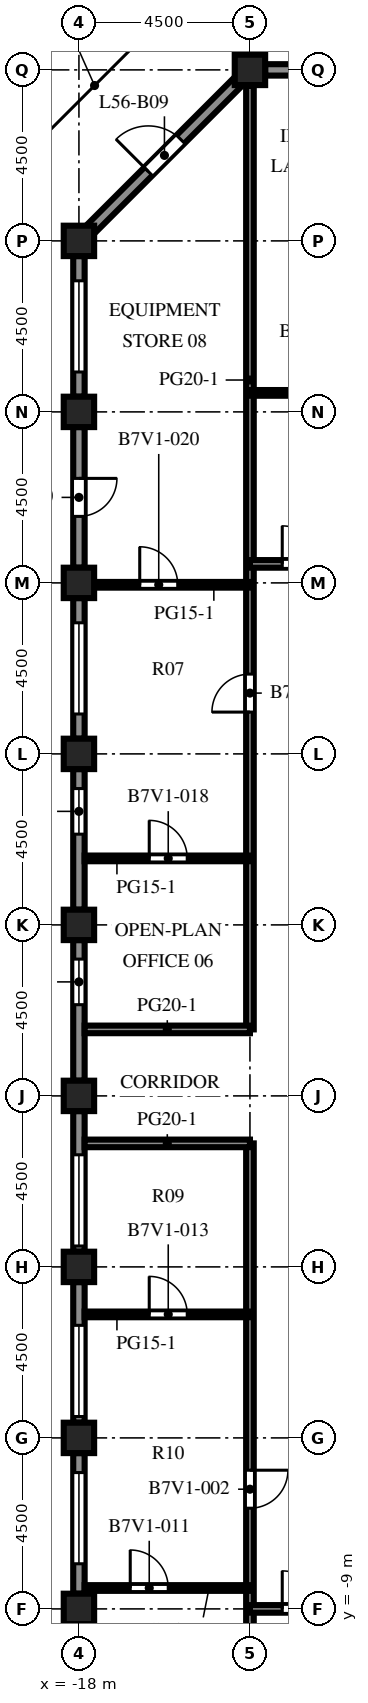
"""IFC4 building model, lengths in metres.
Left out: names, types, materials, properties, quantities, classifications, styles, units other than length and angle.
Written with IfcOpenShell. Run it as: python <this file> out.ifc"""

import sys

from ifc_helpers import new_model, si_unit, direction, frame, frame_2d, origin, origin_2d, place, context, subcontext, project, spatial, rectangle, extrude, element, fill, save


model = new_model("IFC4")
c1 = context("Model", 3, precision=1e-05, world=origin(), true_north=direction((0.0, 1.0)))
c2 = subcontext(c1, "Body", "Model", "MODEL_VIEW")
j1 = project(units=[si_unit("LENGTHUNIT", "METRE"), si_unit("PLANEANGLEUNIT", "RADIAN")], contexts=[c1])
p1 = place(None, origin())
s1 = spatial("IfcSite", under=j1, at=p1, CompositionType="ELEMENT")
p2 = place(p1, origin())
s2 = spatial("IfcBuilding", under=s1, at=p2, CompositionType="ELEMENT")
p3 = place(p2, frame((0.0, 0.0, 248.0)))
s3 = spatial("IfcBuildingStorey", under=s2, at=p3, CompositionType="ELEMENT", Elevation=248.0)
for number, where, z_axis, x_axis in (
    (1, (-18.0, -9.0, 0.0), (0.0, 0.0, 1.0), (1.0, 0.0, 0.0)),
    (2, (-18.0, -4.5, 0.0), (0.0, 0.0, 1.0), (1.0, 0.0, 0.0)),
    (3, (-18.0, 0.0, 0.0), (0.0, 0.0, 1.0), (1.0, 0.0, 0.0)),
    (4, (-18.0, 4.5, 0.0), (0.0, 0.0, 1.0), (1.0, 0.0, 0.0)),
    (5, (-18.0, 9.0, 0.0), (0.0, 0.0, 1.0), (1.0, 0.0, 0.0)),
    (6, (-18.0, 13.5, 0.0), (0.0, 0.0, 1.0), (1.0, 0.0, 0.0)),
    (7, (-18.0, 18.0, 0.0), (0.0, 0.0, 1.0), (1.0, 0.0, 0.0)),
    (8, (-18.0, 22.5, 0.0), (0.0, 0.0, 1.0), (1.0, 0.0, 0.0)),
    (9, (-18.0, 27.0, 0.0), (0.0, 0.0, 1.0), (1.0, 0.0, 0.0)),
    (10, (-13.5, 31.5, 0.0), (0.0, 0.0, 1.0), (1.0, 0.0, 0.0)),
):
    element("IfcColumn", number, at=place(p3, frame(where, z_axis=z_axis, x_axis=x_axis)), inside=s3, PredefinedType="COLUMN", context=c2, shape_type="SweptSolid", body=[
        extrude(rectangle(XDim=0.8, YDim=0.8, at=origin_2d()), origin(), (0.0, 0.0, 1.0), 4.1),
    ])
p4 = place(p3, frame((-13.1, 31.5, 0.0), z_axis=(0.0, 0.0, 1.0), x_axis=(1.0, 0.0, 0.0)))
e11 = element("IfcWall", 11, at=p4, inside=s3, PredefinedType="SOLIDWALL", context=c2, shape_type="SweptSolid", body=[
    extrude(rectangle(XDim=3.7, YDim=0.3, at=frame_2d((1.85, 0.0))), origin(), (0.0, 0.0, 1.0), 2.85),
])
p5 = place(p4, frame((0.65, 0.0, 0.8)))
e12 = element("IfcOpeningElement", 12, at=p5, cuts=e11, PredefinedType="OPENING", context=c2, shape_type="SweptSolid", body=[
    extrude(rectangle(XDim=2.4, YDim=1.7, at=frame_2d((1.2, 0.85))), frame((0.0, 0.16, 0.0), z_axis=(0.0, -1.0, 0.0), x_axis=(1.0, 0.0, 0.0)), (0.0, 0.0, 1.0), 0.32),
])
p6 = place(p3, frame((-17.706, 27.294, 0.0), z_axis=(0.0, 0.0, 1.0), x_axis=(0.707106781187, 0.707106781187, 0.0)))
e13 = element("IfcWall", 13, at=p6, inside=s3, PredefinedType="SOLIDWALL", context=c2, shape_type="SweptSolid", body=[
    extrude(rectangle(XDim=5.532, YDim=0.3, at=frame_2d((2.766, 0.0))), origin(), (0.0, 0.0, 1.0), 2.85),
])
p7 = place(p6, frame((2.166, 0.0, 0.0)))
e14 = element("IfcOpeningElement", 14, at=p7, cuts=e13, PredefinedType="OPENING", context=c2, shape_type="SweptSolid", body=[
    extrude(rectangle(XDim=1.2, YDim=2.2, at=frame_2d((0.6, 1.1))), frame((0.0, 0.16, 0.0), z_axis=(0.0, -1.0, 0.0), x_axis=(1.0, 0.0, 0.0)), (0.0, 0.0, 1.0), 0.32),
])
p8 = place(p3, frame((-18.0, 22.9, 0.0), z_axis=(0.0, 0.0, 1.0), x_axis=(0.0, 1.0, 0.0)))
e15 = element("IfcWall", 15, at=p8, inside=s3, PredefinedType="SOLIDWALL", context=c2, shape_type="SweptSolid", body=[
    extrude(rectangle(XDim=3.7, YDim=0.3, at=frame_2d((1.85, 0.0))), origin(), (0.0, 0.0, 1.0), 2.85),
])
p9 = place(p8, frame((0.65, 0.0, 0.8)))
e16 = element("IfcOpeningElement", 16, at=p9, cuts=e15, PredefinedType="OPENING", context=c2, shape_type="SweptSolid", body=[
    extrude(rectangle(XDim=2.4, YDim=1.7, at=frame_2d((1.2, 0.85))), frame((0.0, 0.16, 0.0), z_axis=(0.0, -1.0, 0.0), x_axis=(1.0, 0.0, 0.0)), (0.0, 0.0, 1.0), 0.32),
])
p10 = place(p3, frame((-18.0, 18.4, 0.0), z_axis=(0.0, 0.0, 1.0), x_axis=(0.0, 1.0, 0.0)))
e17 = element("IfcWall", 17, at=p10, inside=s3, PredefinedType="SOLIDWALL", context=c2, shape_type="SweptSolid", body=[
    extrude(rectangle(XDim=3.7, YDim=0.3, at=frame_2d((1.85, 0.0))), origin(), (0.0, 0.0, 1.0), 2.85),
])
p11 = place(p10, frame((1.35, 0.0, 0.0)))
e18 = element("IfcOpeningElement", 18, at=p11, cuts=e17, PredefinedType="OPENING", context=c2, shape_type="SweptSolid", body=[
    extrude(rectangle(XDim=1.0, YDim=2.2, at=frame_2d((0.5, 1.1))), frame((0.0, 0.16, 0.0), z_axis=(0.0, -1.0, 0.0), x_axis=(1.0, 0.0, 0.0)), (0.0, 0.0, 1.0), 0.32),
])
p12 = place(p3, frame((-18.0, 13.9, 0.0), z_axis=(0.0, 0.0, 1.0), x_axis=(0.0, 1.0, 0.0)))
e19 = element("IfcWall", 19, at=p12, inside=s3, PredefinedType="SOLIDWALL", context=c2, shape_type="SweptSolid", body=[
    extrude(rectangle(XDim=3.7, YDim=0.3, at=frame_2d((1.85, 0.0))), origin(), (0.0, 0.0, 1.0), 2.85),
])
p13 = place(p12, frame((0.65, 0.0, 0.8)))
e20 = element("IfcOpeningElement", 20, at=p13, cuts=e19, PredefinedType="OPENING", context=c2, shape_type="SweptSolid", body=[
    extrude(rectangle(XDim=2.4, YDim=1.7, at=frame_2d((1.2, 0.85))), frame((0.0, 0.16, 0.0), z_axis=(0.0, -1.0, 0.0), x_axis=(1.0, 0.0, 0.0)), (0.0, 0.0, 1.0), 0.32),
])
p14 = place(p3, frame((-18.0, 9.4, 0.0), z_axis=(0.0, 0.0, 1.0), x_axis=(0.0, 1.0, 0.0)))
e21 = element("IfcWall", 21, at=p14, inside=s3, PredefinedType="SOLIDWALL", context=c2, shape_type="SweptSolid", body=[
    extrude(rectangle(XDim=3.7, YDim=0.3, at=frame_2d((1.85, 0.0))), origin(), (0.0, 0.0, 1.0), 2.85),
])
p15 = place(p14, frame((1.988, 0.0, 0.8)))
e22 = element("IfcOpeningElement", 22, at=p15, cuts=e21, PredefinedType="OPENING", context=c2, shape_type="SweptSolid", body=[
    extrude(rectangle(XDim=1.2, YDim=1.7, at=frame_2d((0.6, 0.85))), frame((0.0, 0.16, 0.0), z_axis=(0.0, -1.0, 0.0), x_axis=(1.0, 0.0, 0.0)), (0.0, 0.0, 1.0), 0.32),
])
p16 = place(p3, frame((-18.0, 4.9, 0.0), z_axis=(0.0, 0.0, 1.0), x_axis=(0.0, 1.0, 0.0)))
e23 = element("IfcWall", 23, at=p16, inside=s3, PredefinedType="SOLIDWALL", context=c2, shape_type="SweptSolid", body=[
    extrude(rectangle(XDim=3.7, YDim=0.3, at=frame_2d((1.85, 0.0))), origin(), (0.0, 0.0, 1.0), 2.85),
])
p17 = place(p16, frame((2.0, 0.0, 0.8)))
e24 = element("IfcOpeningElement", 24, at=p17, cuts=e23, PredefinedType="OPENING", context=c2, shape_type="SweptSolid", body=[
    extrude(rectangle(XDim=1.2, YDim=1.7, at=frame_2d((0.6, 0.85))), frame((0.0, 0.16, 0.0), z_axis=(0.0, -1.0, 0.0), x_axis=(1.0, 0.0, 0.0)), (0.0, 0.0, 1.0), 0.32),
])
p18 = place(p3, frame((-18.0, 0.4, 0.0), z_axis=(0.0, 0.0, 1.0), x_axis=(0.0, 1.0, 0.0)))
e25 = element("IfcWall", 25, at=p18, inside=s3, PredefinedType="SOLIDWALL", context=c2, shape_type="SweptSolid", body=[
    extrude(rectangle(XDim=3.7, YDim=0.3, at=frame_2d((1.85, 0.0))), origin(), (0.0, 0.0, 1.0), 2.85),
])
p19 = place(p18, frame((0.15, 0.0, 0.8)))
e26 = element("IfcOpeningElement", 26, at=p19, cuts=e25, PredefinedType="OPENING", context=c2, shape_type="SweptSolid", body=[
    extrude(rectangle(XDim=2.4, YDim=1.7, at=frame_2d((1.2, 0.85))), frame((0.0, 0.16, 0.0), z_axis=(0.0, -1.0, 0.0), x_axis=(1.0, 0.0, 0.0)), (0.0, 0.0, 1.0), 0.32),
])
p20 = place(p3, frame((-18.0, -4.1, 0.0), z_axis=(0.0, 0.0, 1.0), x_axis=(0.0, 1.0, 0.0)))
e27 = element("IfcWall", 27, at=p20, inside=s3, PredefinedType="SOLIDWALL", context=c2, shape_type="SweptSolid", body=[
    extrude(rectangle(XDim=3.7, YDim=0.3, at=frame_2d((1.85, 0.0))), origin(), (0.0, 0.0, 1.0), 2.85),
])
p21 = place(p20, frame((0.163, 0.0, 0.8)))
e28 = element("IfcOpeningElement", 28, at=p21, cuts=e27, PredefinedType="OPENING", context=c2, shape_type="SweptSolid", body=[
    extrude(rectangle(XDim=2.4, YDim=1.7, at=frame_2d((1.2, 0.85))), frame((0.0, 0.16, 0.0), z_axis=(0.0, -1.0, 0.0), x_axis=(1.0, 0.0, 0.0)), (0.0, 0.0, 1.0), 0.32),
])
p22 = place(p3, frame((-18.0, -8.6, 0.0), z_axis=(0.0, 0.0, 1.0), x_axis=(0.0, 1.0, 0.0)))
e29 = element("IfcWall", 29, at=p22, inside=s3, PredefinedType="SOLIDWALL", context=c2, shape_type="SweptSolid", body=[
    extrude(rectangle(XDim=3.7, YDim=0.3, at=frame_2d((1.85, 0.0))), origin(), (0.0, 0.0, 1.0), 2.85),
])
p23 = place(p22, frame((0.788, 0.0, 0.8)))
e30 = element("IfcOpeningElement", 30, at=p23, cuts=e29, PredefinedType="OPENING", context=c2, shape_type="SweptSolid", body=[
    extrude(rectangle(XDim=2.4, YDim=1.7, at=frame_2d((1.2, 0.85))), frame((0.0, 0.16, 0.0), z_axis=(0.0, -1.0, 0.0), x_axis=(1.0, 0.0, 0.0)), (0.0, 0.0, 1.0), 0.32),
])
p24 = place(p3, frame((-13.5, -22.077, 0.0), z_axis=(0.0, 0.0, 1.0), x_axis=(0.0, 1.0, 0.0)))
e31 = element("IfcWall", 31, at=p24, inside=s3, PredefinedType="PARTITIONING", context=c2, shape_type="SweptSolid", body=[
    extrude(rectangle(XDim=25.327, YDim=0.2, at=frame_2d((12.664, 0.0))), origin(), (0.0, 0.0, 1.0), 3.65),
])
p25 = place(p24, frame((15.727, 0.0, 0.0)))
e32 = element("IfcOpeningElement", 32, at=p25, cuts=e31, PredefinedType="OPENING", context=c2, shape_type="SweptSolid", body=[
    extrude(rectangle(XDim=1.0, YDim=2.1, at=frame_2d((0.5, 1.05))), frame((0.0, 0.11, 0.0), z_axis=(0.0, -1.0, 0.0), x_axis=(1.0, 0.0, 0.0)), (0.0, 0.0, 1.0), 0.22),
])
p26 = place(p3, frame((-13.5, 6.25, 0.0), z_axis=(0.0, 0.0, 1.0), x_axis=(0.0, 1.0, 0.0)))
e33 = element("IfcWall", 33, at=p26, inside=s3, PredefinedType="PARTITIONING", context=c2, shape_type="SweptSolid", body=[
    extrude(rectangle(XDim=24.827, YDim=0.2, at=frame_2d((12.414, 0.0))), origin(), (0.0, 0.0, 1.0), 3.65),
])
p27 = place(p26, frame((8.35, 0.0, 0.0)))
e34 = element("IfcOpeningElement", 34, at=p27, cuts=e33, PredefinedType="OPENING", context=c2, shape_type="SweptSolid", body=[
    extrude(rectangle(XDim=1.0, YDim=2.1, at=frame_2d((0.5, 1.05))), frame((0.0, 0.11, 0.0), z_axis=(0.0, -1.0, 0.0), x_axis=(1.0, 0.0, 0.0)), (0.0, 0.0, 1.0), 0.22),
])
p28 = place(p3, frame((-10.5, -9.0, 0.0), z_axis=(0.0, 0.0, 1.0), x_axis=(-1.0, 0.0, 0.0)))
e35 = element("IfcWall", 35, at=p28, inside=s3, PredefinedType="PARTITIONING", context=c2, shape_type="SweptSolid", body=[
    extrude(rectangle(XDim=3.0, YDim=0.2, at=frame_2d((1.5, 0.0))), origin(), (0.0, 0.0, 1.0), 3.65),
])
p29 = place(p28, frame((1.15, 0.0, 0.0)))
e36 = element("IfcOpeningElement", 36, at=p29, cuts=e35, PredefinedType="OPENING", context=c2, shape_type="SweptSolid", body=[
    extrude(rectangle(XDim=1.0, YDim=2.1, at=frame_2d((0.5, 1.05))), frame((0.0, 0.11, 0.0), z_axis=(0.0, -1.0, 0.0), x_axis=(1.0, 0.0, 0.0)), (0.0, 0.0, 1.0), 0.22),
])
p30 = place(p3, frame((-13.5, -8.45, 0.0), z_axis=(0.0, 0.0, 1.0), x_axis=(-1.0, 0.0, 0.0)))
e37 = element("IfcWall", 37, at=p30, inside=s3, PredefinedType="PARTITIONING", context=c2, shape_type="SweptSolid", body=[
    extrude(rectangle(XDim=4.35, YDim=0.15, at=frame_2d((2.175, 0.0))), origin(), (0.0, 0.0, 1.0), 3.65),
])
p31 = place(p30, frame((2.15, 0.0, 0.0)))
e38 = element("IfcOpeningElement", 38, at=p31, cuts=e37, PredefinedType="OPENING", context=c2, shape_type="SweptSolid", body=[
    extrude(rectangle(XDim=1.0, YDim=2.1, at=frame_2d((0.5, 1.05))), frame((0.0, 0.085, 0.0), z_axis=(0.0, -1.0, 0.0), x_axis=(1.0, 0.0, 0.0)), (0.0, 0.0, 1.0), 0.17),
])
p32 = place(p3, frame((-17.85, -1.25, 0.0), z_axis=(0.0, 0.0, 1.0), x_axis=(1.0, 0.0, 0.0)))
e39 = element("IfcWall", 39, at=p32, inside=s3, PredefinedType="PARTITIONING", context=c2, shape_type="SweptSolid", body=[
    extrude(rectangle(XDim=4.35, YDim=0.15, at=frame_2d((2.175, 0.0))), origin(), (0.0, 0.0, 1.0), 3.65),
])
p33 = place(p32, frame((1.7, 0.0, 0.0)))
e40 = element("IfcOpeningElement", 40, at=p33, cuts=e39, PredefinedType="OPENING", context=c2, shape_type="SweptSolid", body=[
    extrude(rectangle(XDim=1.0, YDim=2.1, at=frame_2d((0.5, 1.05))), frame((0.0, 0.085, 0.0), z_axis=(0.0, -1.0, 0.0), x_axis=(1.0, 0.0, 0.0)), (0.0, 0.0, 1.0), 0.17),
])
for number, where, z_axis, x_axis in (
    (41, (-17.85, 3.25, 0.0), (0.0, 0.0, 1.0), (1.0, 0.0, 0.0)),
    (42, (-17.85, 6.25, 0.0), (0.0, 0.0, 1.0), (1.0, 0.0, 0.0)),
):
    element("IfcWall", number, at=place(p3, frame(where, z_axis=z_axis, x_axis=x_axis)), inside=s3, PredefinedType="PARTITIONING", context=c2, shape_type="SweptSolid", body=[
        extrude(rectangle(XDim=4.35, YDim=0.2, at=frame_2d((2.175, 0.0))), origin(), (0.0, 0.0, 1.0), 3.65),
    ])
p34 = place(p3, frame((-13.5, 10.75, 0.0), z_axis=(0.0, 0.0, 1.0), x_axis=(-1.0, 0.0, 0.0)))
e43 = element("IfcWall", 43, at=p34, inside=s3, PredefinedType="PARTITIONING", context=c2, shape_type="SweptSolid", body=[
    extrude(rectangle(XDim=4.35, YDim=0.15, at=frame_2d((2.175, 0.0))), origin(), (0.0, 0.0, 1.0), 3.65),
])
p35 = place(p34, frame((1.65, 0.0, 0.0)))
e44 = element("IfcOpeningElement", 44, at=p35, cuts=e43, PredefinedType="OPENING", context=c2, shape_type="SweptSolid", body=[
    extrude(rectangle(XDim=1.0, YDim=2.1, at=frame_2d((0.5, 1.05))), frame((0.0, 0.085, 0.0), z_axis=(0.0, -1.0, 0.0), x_axis=(1.0, 0.0, 0.0)), (0.0, 0.0, 1.0), 0.17),
])
p36 = place(p3, frame((-17.6, 17.95, 0.0), z_axis=(0.0, 0.0, 1.0), x_axis=(1.0, 0.0, 0.0)))
e45 = element("IfcWall", 45, at=p36, inside=s3, PredefinedType="PARTITIONING", context=c2, shape_type="SweptSolid", body=[
    extrude(rectangle(XDim=4.1, YDim=0.15, at=frame_2d((2.05, 0.0))), origin(), (0.0, 0.0, 1.0), 3.65),
])
p37 = place(p36, frame((1.2, 0.0, 0.0)))
e46 = element("IfcOpeningElement", 46, at=p37, cuts=e45, PredefinedType="OPENING", context=c2, shape_type="SweptSolid", body=[
    extrude(rectangle(XDim=1.0, YDim=2.1, at=frame_2d((0.5, 1.05))), frame((0.0, 0.085, 0.0), z_axis=(0.0, -1.0, 0.0), x_axis=(1.0, 0.0, 0.0)), (0.0, 0.0, 1.0), 0.17),
])
p38 = place(p3, frame((-13.5, 18.5, 0.0), z_axis=(0.0, 0.0, 1.0), x_axis=(1.0, 0.0, 0.0)))
e47 = element("IfcWall", 47, at=p38, inside=s3, PredefinedType="PARTITIONING", context=c2, shape_type="SweptSolid", body=[
    extrude(rectangle(XDim=3.0, YDim=0.2, at=frame_2d((1.5, 0.0))), origin(), (0.0, 0.0, 1.0), 3.65),
])
p39 = place(p38, frame((0.85, 0.0, 0.0)))
e48 = element("IfcOpeningElement", 48, at=p39, cuts=e47, PredefinedType="OPENING", context=c2, shape_type="SweptSolid", body=[
    extrude(rectangle(XDim=1.0, YDim=2.1, at=frame_2d((0.5, 1.05))), frame((0.0, 0.11, 0.0), z_axis=(0.0, -1.0, 0.0), x_axis=(1.0, 0.0, 0.0)), (0.0, 0.0, 1.0), 0.22),
])
p40 = place(p3, frame((-13.5, 23.0, 0.0), z_axis=(0.0, 0.0, 1.0), x_axis=(1.0, 0.0, 0.0)))
e49 = element("IfcWall", 49, at=p40, inside=s3, PredefinedType="PARTITIONING", context=c2, shape_type="SweptSolid", body=[
    extrude(rectangle(XDim=4.0, YDim=0.15, at=frame_2d((2.0, 0.0))), origin(), (0.0, 0.0, 1.0), 3.65),
])
p41 = place(p40, frame((1.35, 0.0, 0.0)))
e50 = element("IfcOpeningElement", 50, at=p41, cuts=e49, PredefinedType="OPENING", context=c2, shape_type="SweptSolid", body=[
    extrude(rectangle(XDim=1.0, YDim=2.1, at=frame_2d((0.5, 1.05))), frame((0.0, 0.085, 0.0), z_axis=(0.0, -1.0, 0.0), x_axis=(1.0, 0.0, 0.0)), (0.0, 0.0, 1.0), 0.17),
])
p42 = place(p7, origin())
e51 = element("IfcDoor", 51, at=p42, inside=s3, OperationType="SINGLE_SWING_LEFT", PredefinedType="DOOR", context=c2, shape_type="SweptSolid", body=[
    extrude(rectangle(XDim=1.2, YDim=2.2, at=frame_2d((0.6, 1.1))), frame((0.0, 0.025, 0.0), z_axis=(0.0, -1.0, 0.0), x_axis=(1.0, 0.0, 0.0)), (0.0, 0.0, 1.0), 0.05),
])
fill(e14, e51)
p43 = place(p9, origin())
e52 = element("IfcWindow", 52, at=p43, inside=s3, PartitioningType="SINGLE_PANEL", PredefinedType="WINDOW", context=c2, shape_type="SweptSolid", body=[
    extrude(rectangle(XDim=2.4, YDim=1.7, at=frame_2d((1.2, 0.85))), frame((0.0, 0.03, 0.0), z_axis=(0.0, -1.0, 0.0), x_axis=(1.0, 0.0, 0.0)), (0.0, 0.0, 1.0), 0.06),
])
fill(e16, e52)
p44 = place(p11, origin())
e53 = element("IfcDoor", 53, at=p44, inside=s3, OperationType="SINGLE_SWING_RIGHT", PredefinedType="DOOR", context=c2, shape_type="SweptSolid", body=[
    extrude(rectangle(XDim=1.0, YDim=2.2, at=frame_2d((0.5, 1.1))), frame((0.0, 0.025, 0.0), z_axis=(0.0, -1.0, 0.0), x_axis=(1.0, 0.0, 0.0)), (0.0, 0.0, 1.0), 0.05),
])
fill(e18, e53)
p45 = place(p13, origin())
e54 = element("IfcWindow", 54, at=p45, inside=s3, PartitioningType="SINGLE_PANEL", PredefinedType="WINDOW", context=c2, shape_type="SweptSolid", body=[
    extrude(rectangle(XDim=2.4, YDim=1.7, at=frame_2d((1.2, 0.85))), frame((0.0, 0.03, 0.0), z_axis=(0.0, -1.0, 0.0), x_axis=(1.0, 0.0, 0.0)), (0.0, 0.0, 1.0), 0.06),
])
fill(e20, e54)
p46 = place(p15, origin())
e55 = element("IfcWindow", 55, at=p46, inside=s3, PartitioningType="SINGLE_PANEL", PredefinedType="WINDOW", context=c2, shape_type="SweptSolid", body=[
    extrude(rectangle(XDim=1.2, YDim=1.7, at=frame_2d((0.6, 0.85))), frame((0.0, 0.03, 0.0), z_axis=(0.0, -1.0, 0.0), x_axis=(1.0, 0.0, 0.0)), (0.0, 0.0, 1.0), 0.06),
])
fill(e22, e55)
p47 = place(p17, origin())
e56 = element("IfcWindow", 56, at=p47, inside=s3, PartitioningType="SINGLE_PANEL", PredefinedType="WINDOW", context=c2, shape_type="SweptSolid", body=[
    extrude(rectangle(XDim=1.2, YDim=1.7, at=frame_2d((0.6, 0.85))), frame((0.0, 0.03, 0.0), z_axis=(0.0, -1.0, 0.0), x_axis=(1.0, 0.0, 0.0)), (0.0, 0.0, 1.0), 0.06),
])
fill(e24, e56)
p48 = place(p19, origin())
e57 = element("IfcWindow", 57, at=p48, inside=s3, PartitioningType="SINGLE_PANEL", PredefinedType="WINDOW", context=c2, shape_type="SweptSolid", body=[
    extrude(rectangle(XDim=2.4, YDim=1.7, at=frame_2d((1.2, 0.85))), frame((0.0, 0.03, 0.0), z_axis=(0.0, -1.0, 0.0), x_axis=(1.0, 0.0, 0.0)), (0.0, 0.0, 1.0), 0.06),
])
fill(e26, e57)
p49 = place(p21, origin())
e58 = element("IfcWindow", 58, at=p49, inside=s3, PartitioningType="SINGLE_PANEL", PredefinedType="WINDOW", context=c2, shape_type="SweptSolid", body=[
    extrude(rectangle(XDim=2.4, YDim=1.7, at=frame_2d((1.2, 0.85))), frame((0.0, 0.03, 0.0), z_axis=(0.0, -1.0, 0.0), x_axis=(1.0, 0.0, 0.0)), (0.0, 0.0, 1.0), 0.06),
])
fill(e28, e58)
p50 = place(p23, origin())
e59 = element("IfcWindow", 59, at=p50, inside=s3, PartitioningType="SINGLE_PANEL", PredefinedType="WINDOW", context=c2, shape_type="SweptSolid", body=[
    extrude(rectangle(XDim=2.4, YDim=1.7, at=frame_2d((1.2, 0.85))), frame((0.0, 0.03, 0.0), z_axis=(0.0, -1.0, 0.0), x_axis=(1.0, 0.0, 0.0)), (0.0, 0.0, 1.0), 0.06),
])
fill(e30, e59)
p51 = place(p25, origin())
e60 = element("IfcDoor", 60, at=p51, inside=s3, OperationType="SINGLE_SWING_RIGHT", PredefinedType="DOOR", context=c2, shape_type="SweptSolid", body=[
    extrude(rectangle(XDim=1.0, YDim=2.1, at=frame_2d((0.5, 1.05))), frame((0.0, 0.025, 0.0), z_axis=(0.0, -1.0, 0.0), x_axis=(1.0, 0.0, 0.0)), (0.0, 0.0, 1.0), 0.05),
])
fill(e32, e60)
p52 = place(p27, origin())
e61 = element("IfcDoor", 61, at=p52, inside=s3, OperationType="SINGLE_SWING_LEFT", PredefinedType="DOOR", context=c2, shape_type="SweptSolid", body=[
    extrude(rectangle(XDim=1.0, YDim=2.1, at=frame_2d((0.5, 1.05))), frame((0.0, 0.025, 0.0), z_axis=(0.0, -1.0, 0.0), x_axis=(1.0, 0.0, 0.0)), (0.0, 0.0, 1.0), 0.05),
])
fill(e34, e61)
p53 = place(p29, origin())
e62 = element("IfcDoor", 62, at=p53, inside=s3, OperationType="SINGLE_SWING_RIGHT", PredefinedType="DOOR", context=c2, shape_type="SweptSolid", body=[
    extrude(rectangle(XDim=1.0, YDim=2.1, at=frame_2d((0.5, 1.05))), frame((0.0, 0.025, 0.0), z_axis=(0.0, -1.0, 0.0), x_axis=(1.0, 0.0, 0.0)), (0.0, 0.0, 1.0), 0.05),
])
fill(e36, e62)
p54 = place(p31, origin())
e63 = element("IfcDoor", 63, at=p54, inside=s3, OperationType="SINGLE_SWING_RIGHT", PredefinedType="DOOR", context=c2, shape_type="SweptSolid", body=[
    extrude(rectangle(XDim=1.0, YDim=2.1, at=frame_2d((0.5, 1.05))), frame((0.0, 0.025, 0.0), z_axis=(0.0, -1.0, 0.0), x_axis=(1.0, 0.0, 0.0)), (0.0, 0.0, 1.0), 0.05),
])
fill(e38, e63)
p55 = place(p33, origin())
e64 = element("IfcDoor", 64, at=p55, inside=s3, OperationType="SINGLE_SWING_LEFT", PredefinedType="DOOR", context=c2, shape_type="SweptSolid", body=[
    extrude(rectangle(XDim=1.0, YDim=2.1, at=frame_2d((0.5, 1.05))), frame((0.0, 0.025, 0.0), z_axis=(0.0, -1.0, 0.0), x_axis=(1.0, 0.0, 0.0)), (0.0, 0.0, 1.0), 0.05),
])
fill(e40, e64)
p56 = place(p35, origin())
e65 = element("IfcDoor", 65, at=p56, inside=s3, OperationType="SINGLE_SWING_RIGHT", PredefinedType="DOOR", context=c2, shape_type="SweptSolid", body=[
    extrude(rectangle(XDim=1.0, YDim=2.1, at=frame_2d((0.5, 1.05))), frame((0.0, 0.025, 0.0), z_axis=(0.0, -1.0, 0.0), x_axis=(1.0, 0.0, 0.0)), (0.0, 0.0, 1.0), 0.05),
])
fill(e44, e65)
p57 = place(p37, origin())
e66 = element("IfcDoor", 66, at=p57, inside=s3, OperationType="SINGLE_SWING_LEFT", PredefinedType="DOOR", context=c2, shape_type="SweptSolid", body=[
    extrude(rectangle(XDim=1.0, YDim=2.1, at=frame_2d((0.5, 1.05))), frame((0.0, 0.025, 0.0), z_axis=(0.0, -1.0, 0.0), x_axis=(1.0, 0.0, 0.0)), (0.0, 0.0, 1.0), 0.05),
])
fill(e46, e66)
p58 = place(p39, origin())
e67 = element("IfcDoor", 67, at=p58, inside=s3, OperationType="SINGLE_SWING_LEFT", PredefinedType="DOOR", context=c2, shape_type="SweptSolid", body=[
    extrude(rectangle(XDim=1.0, YDim=2.1, at=frame_2d((0.5, 1.05))), frame((0.0, 0.025, 0.0), z_axis=(0.0, -1.0, 0.0), x_axis=(1.0, 0.0, 0.0)), (0.0, 0.0, 1.0), 0.05),
])
fill(e48, e67)
save(model, sys.argv[1])
